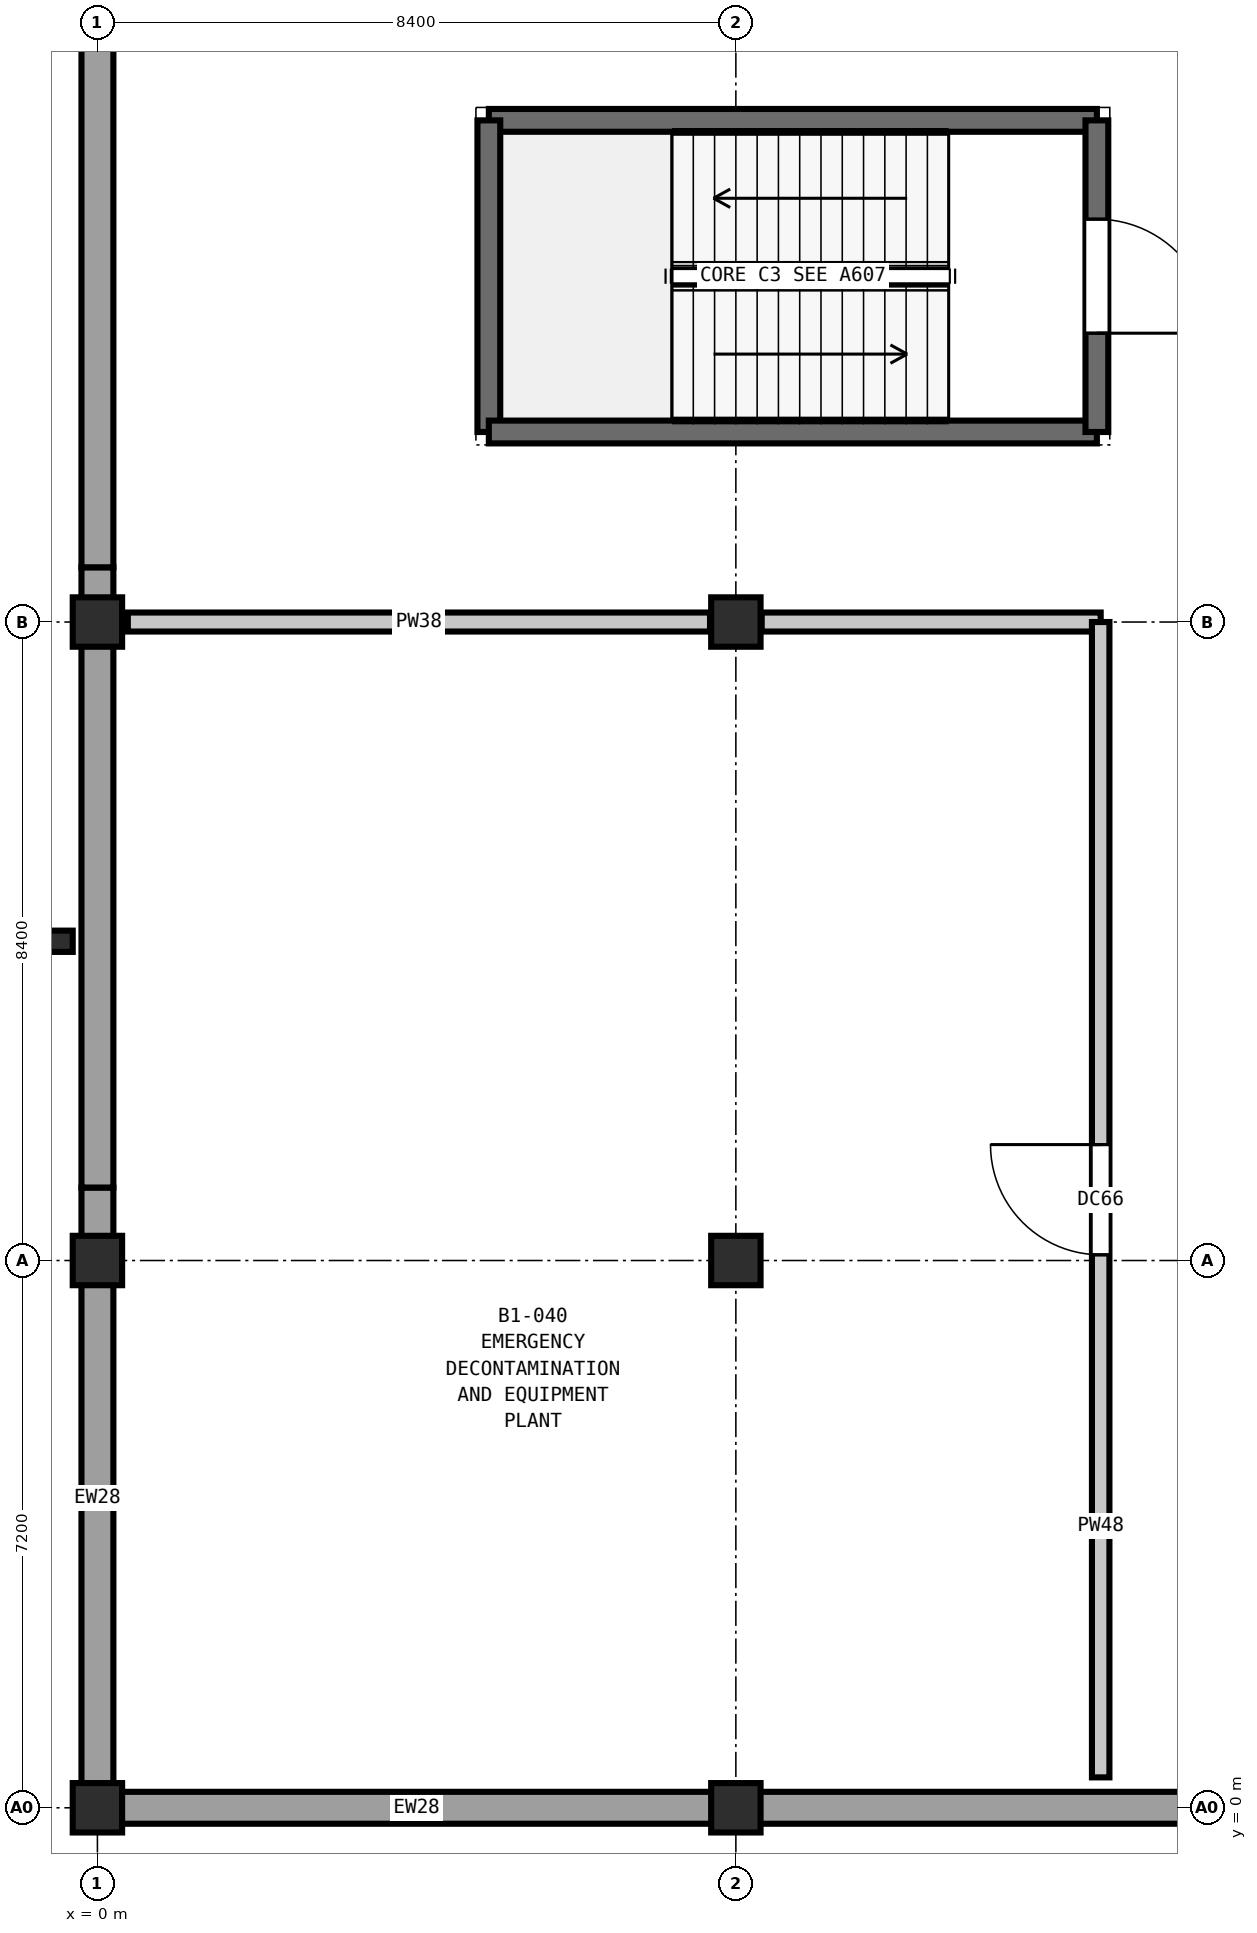
"""IFC4 building model, lengths in metres.
Left out: names, types, materials, properties, quantities, classifications, styles, units other than length and angle.
Written with IfcOpenShell. Run it as: python <this file> out.ifc"""

import sys

from ifc_helpers import new_model, si_unit, direction, frame, frame_2d, origin, origin_2d, place, context, subcontext, project, spatial, rectangle, extrude, element, fill, save


model = new_model("IFC4")
c1 = context("Model", 3, precision=1e-05, world=origin(), true_north=direction((0.0, 1.0)))
c2 = subcontext(c1, "Body", "Model", "MODEL_VIEW")
j1 = project(units=[si_unit("LENGTHUNIT", "METRE"), si_unit("PLANEANGLEUNIT", "RADIAN")], contexts=[c1])
p1 = place(None, origin())
s1 = spatial("IfcSite", under=j1, at=p1, CompositionType="ELEMENT")
p2 = place(p1, origin())
s2 = spatial("IfcBuilding", under=s1, at=p2, CompositionType="ELEMENT")
p3 = place(p2, frame((0.0, 0.0, -4.8)))
s3 = spatial("IfcBuildingStorey", under=s2, at=p3, CompositionType="ELEMENT", Elevation=-4.8)
for number, where, z_axis, x_axis in (
    (1, (0.0, 0.0, 0.0), (0.0, 0.0, 1.0), (1.0, 0.0, 0.0)),
    (2, (0.0, 7.2, 0.0), (0.0, 0.0, 1.0), (1.0, 0.0, 0.0)),
    (3, (0.0, 15.6, 0.0), (0.0, 0.0, 1.0), (1.0, 0.0, 0.0)),
    (4, (8.4, 0.0, 0.0), (0.0, 0.0, 1.0), (1.0, 0.0, 0.0)),
    (5, (8.4, 7.2, 0.0), (0.0, 0.0, 1.0), (1.0, 0.0, 0.0)),
    (6, (8.4, 15.6, 0.0), (0.0, 0.0, 1.0), (1.0, 0.0, 0.0)),
):
    element("IfcColumn", number, at=place(p3, frame(where, z_axis=z_axis, x_axis=x_axis)), inside=s3, PredefinedType="COLUMN", context=c2, shape_type="SweptSolid", body=[
        extrude(rectangle(XDim=0.65, YDim=0.65, at=origin_2d()), origin(), (0.0, 0.0, 1.0), 4.8),
    ])
p4 = place(p3, frame((-0.55, 11.4, 0.0), z_axis=(0.0, 0.0, 1.0), x_axis=(1.0, 0.0, 0.0)))
e7 = element("IfcColumn", 7, at=p4, inside=s3, PredefinedType="PILASTER", context=c2, shape_type="SweptSolid", body=[
    extrude(rectangle(XDim=0.45, YDim=0.28, at=origin_2d()), origin(), (0.0, 0.0, 1.0), 4.8),
])
p5 = place(p3, frame((16.8, 0.0, 0.0), z_axis=(0.0, 0.0, 1.0), x_axis=(-1.0, 0.0, 0.0)))
e8 = element("IfcWall", 8, at=p5, inside=s3, PredefinedType="SOLIDWALL", context=c2, shape_type="SweptSolid", body=[
    extrude(rectangle(XDim=8.4, YDim=0.42, at=frame_2d((4.2, 0.0))), origin(), (0.0, 0.0, 1.0), 4.05),
])
p6 = place(p3, frame((8.4, 0.0, 0.0), z_axis=(0.0, 0.0, 1.0), x_axis=(-1.0, 0.0, 0.0)))
e9 = element("IfcWall", 9, at=p6, inside=s3, PredefinedType="SOLIDWALL", context=c2, shape_type="SweptSolid", body=[
    extrude(rectangle(XDim=8.4, YDim=0.42, at=frame_2d((4.2, 0.0))), origin(), (0.0, 0.0, 1.0), 4.05),
])
p7 = place(p3, frame((0.0, 0.0, 0.0), z_axis=(0.0, 0.0, 1.0), x_axis=(0.0, 1.0, 0.0)))
e10 = element("IfcWall", 10, at=p7, inside=s3, PredefinedType="SOLIDWALL", context=c2, shape_type="SweptSolid", body=[
    extrude(rectangle(XDim=8.16, YDim=0.42, at=frame_2d((4.08, 0.0))), origin(), (0.0, 0.0, 1.0), 4.05),
])
p8 = place(p3, frame((0.0, 8.16, 0.0), z_axis=(0.0, 0.0, 1.0), x_axis=(0.0, 1.0, 0.0)))
e11 = element("IfcWall", 11, at=p8, inside=s3, PredefinedType="SOLIDWALL", context=c2, shape_type="SweptSolid", body=[
    extrude(rectangle(XDim=8.16, YDim=0.42, at=frame_2d((4.08, 0.0))), origin(), (0.0, 0.0, 1.0), 4.05),
])
p9 = place(p3, frame((0.0, 16.32, 0.0), z_axis=(0.0, 0.0, 1.0), x_axis=(0.0, 1.0, 0.0)))
e12 = element("IfcWall", 12, at=p9, inside=s3, PredefinedType="SOLIDWALL", context=c2, shape_type="SweptSolid", body=[
    extrude(rectangle(XDim=8.16, YDim=0.42, at=frame_2d((4.08, 0.0))), origin(), (0.0, 0.0, 1.0), 4.05),
])
p10 = place(p3, frame((13.15, 22.2, 0.0), z_axis=(0.0, 0.0, 1.0), x_axis=(-1.0, 0.0, 0.0)))
e13 = element("IfcWall", 13, at=p10, inside=s3, PredefinedType="SHEAR", context=c2, shape_type="SweptSolid", body=[
    extrude(rectangle(XDim=8.0, YDim=0.3, at=frame_2d((4.0, 0.0))), origin(), (0.0, 0.0, 1.0), 4.8),
])
p11 = place(p3, frame((5.15, 22.2, 0.0), z_axis=(0.0, 0.0, 1.0), x_axis=(0.0, -1.0, 0.0)))
e14 = element("IfcWall", 14, at=p11, inside=s3, PredefinedType="SHEAR", context=c2, shape_type="SweptSolid", body=[
    extrude(rectangle(XDim=4.1, YDim=0.3, at=frame_2d((2.05, 0.0))), origin(), (0.0, 0.0, 1.0), 4.8),
])
p12 = place(p3, frame((5.15, 18.1, 0.0), z_axis=(0.0, 0.0, 1.0), x_axis=(1.0, 0.0, 0.0)))
e15 = element("IfcWall", 15, at=p12, inside=s3, PredefinedType="SHEAR", context=c2, shape_type="SweptSolid", body=[
    extrude(rectangle(XDim=8.0, YDim=0.3, at=frame_2d((4.0, 0.0))), origin(), (0.0, 0.0, 1.0), 4.8),
])
p13 = place(p3, frame((13.15, 18.1, 0.0), z_axis=(0.0, 0.0, 1.0), x_axis=(0.0, 1.0, 0.0)))
e16 = element("IfcWall", 16, at=p13, inside=s3, PredefinedType="SHEAR", context=c2, shape_type="SweptSolid", body=[
    extrude(rectangle(XDim=4.1, YDim=0.3, at=frame_2d((2.05, 0.0))), origin(), (0.0, 0.0, 1.0), 4.8),
])
p14 = place(p13, frame((1.3, 0.0, 0.0)))
e17 = element("IfcOpeningElement", 17, at=p14, cuts=e16, PredefinedType="OPENING", context=c2, shape_type="SweptSolid", body=[
    extrude(rectangle(XDim=1.5, YDim=2.2, at=frame_2d((0.75, 1.1))), frame((0.0, 0.16, 0.0), z_axis=(0.0, -1.0, 0.0), x_axis=(1.0, 0.0, 0.0)), (0.0, 0.0, 1.0), 0.32),
])
p15 = place(p3, frame((0.4, 15.6, 0.0), z_axis=(0.0, 0.0, 1.0), x_axis=(1.0, 0.0, 0.0)))
e18 = element("IfcWall", 18, at=p15, inside=s3, PredefinedType="PARTITIONING", context=c2, shape_type="SweptSolid", body=[
    extrude(rectangle(XDim=7.66, YDim=0.25, at=frame_2d((3.83, 0.0))), origin(), (0.0, 0.0, 1.0), 3.985),
])
p16 = place(p3, frame((8.74, 15.6, 0.0), z_axis=(0.0, 0.0, 1.0), x_axis=(1.0, 0.0, 0.0)))
e19 = element("IfcWall", 19, at=p16, inside=s3, PredefinedType="PARTITIONING", context=c2, shape_type="SweptSolid", body=[
    extrude(rectangle(XDim=4.46, YDim=0.25, at=frame_2d((2.23, 0.0))), origin(), (0.0, 0.0, 1.0), 3.985),
])
p17 = place(p3, frame((13.2, 0.4, 0.0), z_axis=(0.0, 0.0, 1.0), x_axis=(0.0, 1.0, 0.0)))
e20 = element("IfcWall", 20, at=p17, inside=s3, PredefinedType="PARTITIONING", context=c2, shape_type="SweptSolid", body=[
    extrude(rectangle(XDim=15.2, YDim=0.23, at=frame_2d((7.6, 0.0))), origin(), (0.0, 0.0, 1.0), 4.44),
])
p18 = place(p17, frame((6.875, 0.0, 0.0)))
e21 = element("IfcOpeningElement", 21, at=p18, cuts=e20, PredefinedType="OPENING", context=c2, shape_type="SweptSolid", body=[
    extrude(rectangle(XDim=1.45, YDim=2.25, at=frame_2d((0.725, 1.125))), frame((0.0, 0.125, 0.0), z_axis=(0.0, -1.0, 0.0), x_axis=(1.0, 0.0, 0.0)), (0.0, 0.0, 1.0), 0.25),
])
p19 = place(p14, frame((1.5, 0.0, 0.0), z_axis=(0.0, 0.0, 1.0), x_axis=(-1.0, 0.0, 0.0)))
e22 = element("IfcDoor", 22, at=p19, inside=s3, OperationType="SINGLE_SWING_RIGHT", PredefinedType="DOOR", context=c2, shape_type="SweptSolid", body=[
    extrude(rectangle(XDim=1.5, YDim=2.2, at=frame_2d((0.75, 1.1))), frame((0.0, 0.025, 0.0), z_axis=(0.0, -1.0, 0.0), x_axis=(1.0, 0.0, 0.0)), (0.0, 0.0, 1.0), 0.05),
])
fill(e17, e22)
p20 = place(p18, origin())
e23 = element("IfcDoor", 23, at=p20, inside=s3, OperationType="SINGLE_SWING_RIGHT", PredefinedType="DOOR", context=c2, shape_type="SweptSolid", body=[
    extrude(rectangle(XDim=1.45, YDim=2.25, at=frame_2d((0.725, 1.125))), frame((0.0, 0.025, 0.0), z_axis=(0.0, -1.0, 0.0), x_axis=(1.0, 0.0, 0.0)), (0.0, 0.0, 1.0), 0.05),
])
fill(e21, e23)
save(model, sys.argv[1])
